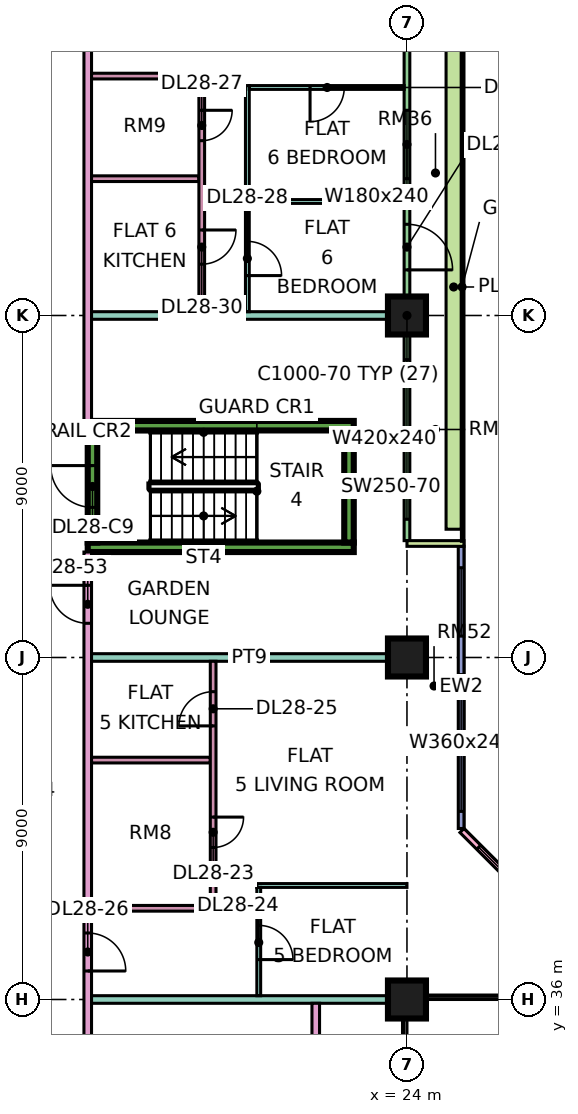
"""IFC4 building model, lengths in metres.
Left out: names, types, materials, properties, quantities, classifications, styles, units other than length and angle.
Written with IfcOpenShell. Run it as: python <this file> out.ifc"""

import sys

from ifc_helpers import new_model, si_unit, direction, frame, frame_2d, origin, origin_2d, place, context, subcontext, project, spatial, rectangle, extrude, element, fill, save


model = new_model("IFC4")
c1 = context("Model", 3, precision=1e-05, world=origin(), true_north=direction((0.0, 1.0)))
c2 = subcontext(c1, "Body", "Model", "MODEL_VIEW")
j1 = project(units=[si_unit("LENGTHUNIT", "METRE"), si_unit("PLANEANGLEUNIT", "RADIAN")], contexts=[c1])
p1 = place(None, origin())
s1 = spatial("IfcSite", under=j1, at=p1, CompositionType="ELEMENT")
p2 = place(p1, origin())
s2 = spatial("IfcBuilding", under=s1, at=p2, CompositionType="ELEMENT")
p3 = place(p2, frame((0.0, 0.0, 121.9)))
s3 = spatial("IfcBuildingStorey", under=s2, at=p3, CompositionType="ELEMENT", Elevation=121.9)
for number, where, z_axis, x_axis in (
    (1, (24.0, 36.0, 0.0), (0.0, 0.0, 1.0), (1.0, 0.0, 0.0)),
    (2, (24.0, 45.0, 0.0), (0.0, 0.0, 1.0), (1.0, 0.0, 0.0)),
    (3, (24.0, 54.0, 0.0), (0.0, 0.0, 1.0), (1.0, 0.0, 0.0)),
):
    element("IfcColumn", number, at=place(p3, frame(where, z_axis=z_axis, x_axis=x_axis)), inside=s3, PredefinedType="COLUMN", context=c2, shape_type="SweptSolid", body=[
        extrude(rectangle(XDim=1.0, YDim=1.0, at=origin_2d()), origin(), (0.0, 0.0, 1.0), 3.75),
    ])
for number, where, z_axis, x_axis in (
    (4, (15.6, 47.9, 0.0), (0.0, 0.0, 1.0), (1.0, 0.0, 0.0)),
    (5, (15.6, 51.1, 0.0), (0.0, 0.0, 1.0), (1.0, 0.0, 0.0)),
):
    element("IfcWall", number, at=place(p3, frame(where, z_axis=z_axis, x_axis=x_axis)), inside=s3, PredefinedType="SHEAR", context=c2, shape_type="SweptSolid", body=[
        extrude(rectangle(XDim=7.0, YDim=0.25, at=frame_2d((3.5, 0.0))), origin(), (0.0, 0.0, 1.0), 3.75),
    ])
p4 = place(p3, frame((15.725, 48.025, 0.0), z_axis=(0.0, 0.0, 1.0), x_axis=(0.0, 1.0, 0.0)))
e6 = element("IfcWall", 6, at=p4, inside=s3, PredefinedType="SHEAR", context=c2, shape_type="SweptSolid", body=[
    extrude(rectangle(XDim=2.95, YDim=0.25, at=frame_2d((1.475, 0.0))), origin(), (0.0, 0.0, 1.0), 3.75),
])
p5 = place(p4, frame((0.925, 0.0, 0.0)))
e7 = element("IfcOpeningElement", 7, at=p5, cuts=e6, PredefinedType="OPENING", context=c2, shape_type="SweptSolid", body=[
    extrude(rectangle(XDim=1.1, YDim=2.2, at=frame_2d((0.55, 1.1))), frame((0.0, 0.135, 0.0), z_axis=(0.0, -1.0, 0.0), x_axis=(1.0, 0.0, 0.0)), (0.0, 0.0, 1.0), 0.27),
])
p6 = place(p3, frame((22.475, 48.025, 0.0), z_axis=(0.0, 0.0, 1.0), x_axis=(0.0, 1.0, 0.0)))
e8 = element("IfcWall", 8, at=p6, inside=s3, PredefinedType="SHEAR", context=c2, shape_type="SweptSolid", body=[
    extrude(rectangle(XDim=2.95, YDim=0.25, at=frame_2d((1.475, 0.0))), origin(), (0.0, 0.0, 1.0), 3.75),
])
p7 = place(p3, frame((28.447, 37.447, 0.0), z_axis=(0.0, 0.0, 1.0), x_axis=(-0.707106781187, 0.707106781187, 0.0)))
e9 = element("IfcWall", 9, at=p7, inside=s3, PredefinedType="SOLIDWALL", context=c2, shape_type="SweptSolid", body=[
    extrude(rectangle(XDim=4.243, YDim=0.15, at=frame_2d((2.121, 0.0))), origin(), (0.0, 0.0, 1.0), 3.35),
])
p8 = place(p7, frame((0.621, 0.0, 0.45)))
e10 = element("IfcOpeningElement", 10, at=p8, cuts=e9, PredefinedType="OPENING", context=c2, shape_type="SweptSolid", body=[
    extrude(rectangle(XDim=3.0, YDim=2.4, at=frame_2d((1.5, 1.2))), frame((0.0, 0.085, 0.0), z_axis=(0.0, -1.0, 0.0), x_axis=(1.0, 0.0, 0.0)), (0.0, 0.0, 1.0), 0.17),
])
p9 = place(p3, frame((25.425, 40.5, 0.0), z_axis=(0.0, 0.0, 1.0), x_axis=(0.0, 1.0, 0.0)))
e11 = element("IfcWall", 11, at=p9, inside=s3, PredefinedType="SOLIDWALL", context=c2, shape_type="SweptSolid", body=[
    extrude(rectangle(XDim=7.425, YDim=0.15, at=frame_2d((3.712, 0.0))), origin(), (0.0, 0.0, 1.0), 3.35),
])
p10 = place(p9, frame((0.45, 0.0, 0.45)))
e12 = element("IfcOpeningElement", 12, at=p10, cuts=e11, PredefinedType="OPENING", context=c2, shape_type="SweptSolid", body=[
    extrude(rectangle(XDim=3.6, YDim=2.4, at=frame_2d((1.8, 1.2))), frame((0.0, 0.085, 0.0), z_axis=(0.0, -1.0, 0.0), x_axis=(1.0, 0.0, 0.0)), (0.0, 0.0, 1.0), 0.17),
])
p11 = place(p9, frame((5.062, 0.0, 0.45)))
e13 = element("IfcOpeningElement", 13, at=p11, cuts=e11, PredefinedType="OPENING", context=c2, shape_type="SweptSolid", body=[
    extrude(rectangle(XDim=1.8, YDim=2.4, at=frame_2d((0.9, 1.2))), frame((0.0, 0.085, 0.0), z_axis=(0.0, -1.0, 0.0), x_axis=(1.0, 0.0, 0.0)), (0.0, 0.0, 1.0), 0.17),
])
p12 = place(p3, frame((24.0, 48.075, 0.0), z_axis=(0.0, 0.0, 1.0), x_axis=(0.0, 1.0, 0.0)))
e14 = element("IfcWall", 14, at=p12, inside=s3, PredefinedType="SOLIDWALL", context=c2, shape_type="SweptSolid", body=[
    extrude(rectangle(XDim=13.35, YDim=0.15, at=frame_2d((6.675, 0.0))), origin(), (0.0, 0.0, 1.0), 3.35),
])
p13 = place(p12, frame((0.562, 0.0, 0.45)))
e15 = element("IfcOpeningElement", 15, at=p13, cuts=e14, PredefinedType="OPENING", context=c2, shape_type="SweptSolid", body=[
    extrude(rectangle(XDim=4.2, YDim=2.4, at=frame_2d((2.1, 1.2))), frame((0.0, 0.085, 0.0), z_axis=(0.0, -1.0, 0.0), x_axis=(1.0, 0.0, 0.0)), (0.0, 0.0, 1.0), 0.17),
])
p14 = place(p12, frame((7.125, 0.0, 0.0)))
e16 = element("IfcOpeningElement", 16, at=p14, cuts=e14, PredefinedType="OPENING", context=c2, shape_type="SweptSolid", body=[
    extrude(rectangle(XDim=1.2, YDim=2.4, at=frame_2d((0.6, 1.2))), frame((0.0, 0.085, 0.0), z_axis=(0.0, -1.0, 0.0), x_axis=(1.0, 0.0, 0.0)), (0.0, 0.0, 1.0), 0.17),
])
p15 = place(p12, frame((9.525, 0.0, 0.45)))
e17 = element("IfcOpeningElement", 17, at=p15, cuts=e14, PredefinedType="OPENING", context=c2, shape_type="SweptSolid", body=[
    extrude(rectangle(XDim=1.8, YDim=2.4, at=frame_2d((0.9, 1.2))), frame((0.0, 0.085, 0.0), z_axis=(0.0, -1.0, 0.0), x_axis=(1.0, 0.0, 0.0)), (0.0, 0.0, 1.0), 0.17),
])
p16 = place(p3, frame((25.5, 48.0, 0.0), z_axis=(0.0, 0.0, 1.0), x_axis=(-1.0, 0.0, 0.0)))
e18 = element("IfcWall", 18, at=p16, inside=s3, PredefinedType="SOLIDWALL", context=c2, shape_type="SweptSolid", body=[
    extrude(rectangle(XDim=1.5, YDim=0.15, at=frame_2d((0.75, 0.0))), origin(), (0.0, 0.0, 1.0), 3.35),
])
p17 = place(p3, frame((25.229, 48.375, 0.0), z_axis=(0.0, 0.0, 1.0), x_axis=(0.0, 1.0, 0.0)))
e19 = element("IfcWall", 19, at=p17, inside=s3, PredefinedType="SOLIDWALL", context=c2, shape_type="SweptSolid", body=[
    extrude(rectangle(XDim=12.75, YDim=0.4, at=frame_2d((6.375, 0.0))), origin(), (0.0, 0.0, 1.0), 0.7),
])
p18 = place(p3, frame((15.6, 20.0, 0.0), z_axis=(0.0, 0.0, 1.0), x_axis=(0.0, 1.0, 0.0)))
e20 = element("IfcWall", 20, at=p18, inside=s3, PredefinedType="PARTITIONING", context=c2, shape_type="SweptSolid", body=[
    extrude(rectangle(XDim=27.775, YDim=0.2, at=frame_2d((13.887, 0.0))), origin(), (0.0, 0.0, 1.0), 3.35),
])
p19 = place(p18, frame((7.0, 0.0, 0.0)))
e21 = element("IfcOpeningElement", 21, at=p19, cuts=e20, PredefinedType="OPENING", context=c2, shape_type="SweptSolid", body=[
    extrude(rectangle(XDim=1.0, YDim=2.1, at=frame_2d((0.5, 1.05))), frame((0.0, 0.11, 0.0), z_axis=(0.0, -1.0, 0.0), x_axis=(1.0, 0.0, 0.0)), (0.0, 0.0, 1.0), 0.22),
])
p20 = place(p18, frame((12.95, 0.0, 0.0)))
e22 = element("IfcOpeningElement", 22, at=p20, cuts=e20, PredefinedType="OPENING", context=c2, shape_type="SweptSolid", body=[
    extrude(rectangle(XDim=1.0, YDim=2.1, at=frame_2d((0.5, 1.05))), frame((0.0, 0.11, 0.0), z_axis=(0.0, -1.0, 0.0), x_axis=(1.0, 0.0, 0.0)), (0.0, 0.0, 1.0), 0.22),
])
p21 = place(p18, frame((16.75, 0.0, 0.0)))
e23 = element("IfcOpeningElement", 23, at=p21, cuts=e20, PredefinedType="OPENING", context=c2, shape_type="SweptSolid", body=[
    extrude(rectangle(XDim=1.0, YDim=2.1, at=frame_2d((0.5, 1.05))), frame((0.0, 0.11, 0.0), z_axis=(0.0, -1.0, 0.0), x_axis=(1.0, 0.0, 0.0)), (0.0, 0.0, 1.0), 0.22),
])
p22 = place(p18, frame((1.15, 0.0, 0.0)))
e24 = element("IfcOpeningElement", 24, at=p22, cuts=e20, PredefinedType="OPENING", context=c2, shape_type="SweptSolid", body=[
    extrude(rectangle(XDim=1.8, YDim=2.1, at=frame_2d((0.9, 1.05))), frame((0.0, 0.11, 0.0), z_axis=(0.0, -1.0, 0.0), x_axis=(1.0, 0.0, 0.0)), (0.0, 0.0, 1.0), 0.22),
])
p23 = place(p18, frame((25.9, 0.0, 0.0)))
e25 = element("IfcOpeningElement", 25, at=p23, cuts=e20, PredefinedType="OPENING", context=c2, shape_type="SweptSolid", body=[
    extrude(rectangle(XDim=1.0, YDim=2.1, at=frame_2d((0.5, 1.05))), frame((0.0, 0.11, 0.0), z_axis=(0.0, -1.0, 0.0), x_axis=(1.0, 0.0, 0.0)), (0.0, 0.0, 1.0), 0.22),
])
p24 = place(p3, frame((15.6, 51.225, 0.0), z_axis=(0.0, 0.0, 1.0), x_axis=(0.0, 1.0, 0.0)))
e26 = element("IfcWall", 26, at=p24, inside=s3, PredefinedType="PARTITIONING", context=c2, shape_type="SweptSolid", body=[
    extrude(rectangle(XDim=13.125, YDim=0.2, at=frame_2d((6.562, 0.0))), origin(), (0.0, 0.0, 1.0), 3.35),
])
p25 = place(p24, frame((9.975, 0.0, 0.0)))
e27 = element("IfcOpeningElement", 27, at=p25, cuts=e26, PredefinedType="OPENING", context=c2, shape_type="SweptSolid", body=[
    extrude(rectangle(XDim=1.0, YDim=2.1, at=frame_2d((0.5, 1.05))), frame((0.0, 0.11, 0.0), z_axis=(0.0, -1.0, 0.0), x_axis=(1.0, 0.0, 0.0)), (0.0, 0.0, 1.0), 0.22),
])
p26 = place(p3, frame((15.7, 36.0, 0.0), z_axis=(0.0, 0.0, 1.0), x_axis=(1.0, 0.0, 0.0)))
e28 = element("IfcWall", 28, at=p26, inside=s3, PredefinedType="PARTITIONING", context=c2, shape_type="SweptSolid", body=[
    extrude(rectangle(XDim=8.3, YDim=0.2, at=frame_2d((4.15, 0.0))), origin(), (0.0, 0.0, 1.0), 3.35),
])
for number, where, z_axis, x_axis in (
    (29, (15.7, 38.4, 0.0), (0.0, 0.0, 1.0), (1.0, 0.0, 0.0)),
    (30, (15.7, 42.3, 0.0), (0.0, 0.0, 1.0), (1.0, 0.0, 0.0)),
):
    element("IfcWall", number, at=place(p3, frame(where, z_axis=z_axis, x_axis=x_axis)), inside=s3, PredefinedType="PARTITIONING", context=c2, shape_type="SweptSolid", body=[
        extrude(rectangle(XDim=3.125, YDim=0.15, at=frame_2d((1.562, 0.0))), origin(), (0.0, 0.0, 1.0), 3.35),
    ])
p27 = place(p3, frame((15.7, 45.0, 0.0), z_axis=(0.0, 0.0, 1.0), x_axis=(1.0, 0.0, 0.0)))
e31 = element("IfcWall", 31, at=p27, inside=s3, PredefinedType="PARTITIONING", context=c2, shape_type="SweptSolid", body=[
    extrude(rectangle(XDim=8.3, YDim=0.2, at=frame_2d((4.15, 0.0))), origin(), (0.0, 0.0, 1.0), 3.35),
])
p28 = place(p3, frame((15.7, 54.0, 0.0), z_axis=(0.0, 0.0, 1.0), x_axis=(1.0, 0.0, 0.0)))
e32 = element("IfcWall", 32, at=p28, inside=s3, PredefinedType="PARTITIONING", context=c2, shape_type="SweptSolid", body=[
    extrude(rectangle(XDim=8.226, YDim=0.2, at=frame_2d((4.113, 0.0))), origin(), (0.0, 0.0, 1.0), 3.35),
])
for number, where, z_axis, x_axis in (
    (33, (15.7, 57.6, 0.0), (0.0, 0.0, 1.0), (1.0, 0.0, 0.0)),
    (34, (15.7, 60.3, 0.0), (0.0, 0.0, 1.0), (1.0, 0.0, 0.0)),
):
    element("IfcWall", number, at=place(p3, frame(where, z_axis=z_axis, x_axis=x_axis)), inside=s3, PredefinedType="PARTITIONING", context=c2, shape_type="SweptSolid", body=[
        extrude(rectangle(XDim=2.825, YDim=0.15, at=frame_2d((1.413, 0.0))), origin(), (0.0, 0.0, 1.0), 3.35),
    ])
p29 = place(p3, frame((18.6, 54.1, 0.0), z_axis=(0.0, 0.0, 1.0), x_axis=(0.0, 1.0, 0.0)))
e35 = element("IfcWall", 35, at=p29, inside=s3, PredefinedType="PARTITIONING", context=c2, shape_type="SweptSolid", body=[
    extrude(rectangle(XDim=6.275, YDim=0.15, at=frame_2d((3.137, 0.0))), origin(), (0.0, 0.0, 1.0), 3.35),
])
p30 = place(p29, frame((4.5, 0.0, 0.0)))
e36 = element("IfcOpeningElement", 36, at=p30, cuts=e35, PredefinedType="OPENING", context=c2, shape_type="SweptSolid", body=[
    extrude(rectangle(XDim=0.8, YDim=2.1, at=frame_2d((0.4, 1.05))), frame((0.0, 0.085, 0.0), z_axis=(0.0, -1.0, 0.0), x_axis=(1.0, 0.0, 0.0)), (0.0, 0.0, 1.0), 0.17),
])
p31 = place(p29, frame((1.25, 0.0, 0.0)))
e37 = element("IfcOpeningElement", 37, at=p31, cuts=e35, PredefinedType="OPENING", context=c2, shape_type="SweptSolid", body=[
    extrude(rectangle(XDim=0.9, YDim=2.1, at=frame_2d((0.45, 1.05))), frame((0.0, 0.085, 0.0), z_axis=(0.0, -1.0, 0.0), x_axis=(1.0, 0.0, 0.0)), (0.0, 0.0, 1.0), 0.17),
])
p32 = place(p3, frame((18.9, 38.325, 0.0), z_axis=(0.0, 0.0, 1.0), x_axis=(0.0, 1.0, 0.0)))
e38 = element("IfcWall", 38, at=p32, inside=s3, PredefinedType="PARTITIONING", context=c2, shape_type="SweptSolid", body=[
    extrude(rectangle(XDim=6.575, YDim=0.15, at=frame_2d((3.288, 0.0))), origin(), (0.0, 0.0, 1.0), 3.35),
])
p33 = place(p32, frame((1.675, 0.0, 0.0)))
e39 = element("IfcOpeningElement", 39, at=p33, cuts=e38, PredefinedType="OPENING", context=c2, shape_type="SweptSolid", body=[
    extrude(rectangle(XDim=0.8, YDim=2.1, at=frame_2d((0.4, 1.05))), frame((0.0, 0.085, 0.0), z_axis=(0.0, -1.0, 0.0), x_axis=(1.0, 0.0, 0.0)), (0.0, 0.0, 1.0), 0.17),
])
p34 = place(p32, frame((4.875, 0.0, 0.0)))
e40 = element("IfcOpeningElement", 40, at=p34, cuts=e38, PredefinedType="OPENING", context=c2, shape_type="SweptSolid", body=[
    extrude(rectangle(XDim=0.9, YDim=2.1, at=frame_2d((0.45, 1.05))), frame((0.0, 0.085, 0.0), z_axis=(0.0, -1.0, 0.0), x_axis=(1.0, 0.0, 0.0)), (0.0, 0.0, 1.0), 0.17),
])
p35 = place(p3, frame((19.8, 54.1, 0.0), z_axis=(0.0, 0.0, 1.0), x_axis=(0.0, 1.0, 0.0)))
e41 = element("IfcWall", 41, at=p35, inside=s3, PredefinedType="PARTITIONING", context=c2, shape_type="SweptSolid", body=[
    extrude(rectangle(XDim=5.95, YDim=0.1, at=frame_2d((2.975, 0.0))), origin(), (0.0, 0.0, 1.0), 3.35),
])
p36 = place(p35, frame((0.95, 0.0, 0.0)))
e42 = element("IfcOpeningElement", 42, at=p36, cuts=e41, PredefinedType="OPENING", context=c2, shape_type="SweptSolid", body=[
    extrude(rectangle(XDim=0.9, YDim=2.1, at=frame_2d((0.45, 1.05))), frame((0.0, 0.06, 0.0), z_axis=(0.0, -1.0, 0.0), x_axis=(1.0, 0.0, 0.0)), (0.0, 0.0, 1.0), 0.12),
])
p37 = place(p3, frame((19.85, 57.0, 0.0), z_axis=(0.0, 0.0, 1.0), x_axis=(1.0, 0.0, 0.0)))
e43 = element("IfcWall", 43, at=p37, inside=s3, PredefinedType="PARTITIONING", context=c2, shape_type="SweptSolid", body=[
    extrude(rectangle(XDim=4.076, YDim=0.1, at=frame_2d((2.038, 0.0))), origin(), (0.0, 0.0, 1.0), 3.35),
])
p38 = place(p3, frame((19.85, 60.0, 0.0), z_axis=(0.0, 0.0, 1.0), x_axis=(1.0, 0.0, 0.0)))
e44 = element("IfcWall", 44, at=p38, inside=s3, PredefinedType="PARTITIONING", context=c2, shape_type="SweptSolid", body=[
    extrude(rectangle(XDim=4.076, YDim=0.1, at=frame_2d((2.038, 0.0))), origin(), (0.0, 0.0, 1.0), 3.35),
])
p39 = place(p38, frame((1.6, 0.0, 0.0)))
e45 = element("IfcOpeningElement", 45, at=p39, cuts=e44, PredefinedType="OPENING", context=c2, shape_type="SweptSolid", body=[
    extrude(rectangle(XDim=0.9, YDim=2.1, at=frame_2d((0.45, 1.05))), frame((0.0, 0.06, 0.0), z_axis=(0.0, -1.0, 0.0), x_axis=(1.0, 0.0, 0.0)), (0.0, 0.0, 1.0), 0.12),
])
p40 = place(p3, frame((20.05, 39.0, 0.0), z_axis=(0.0, 0.0, 1.0), x_axis=(1.0, 0.0, 0.0)))
e46 = element("IfcWall", 46, at=p40, inside=s3, PredefinedType="PARTITIONING", context=c2, shape_type="SweptSolid", body=[
    extrude(rectangle(XDim=3.95, YDim=0.1, at=frame_2d((1.975, 0.0))), origin(), (0.0, 0.0, 1.0), 3.35),
])
p41 = place(p3, frame((20.1, 36.1, 0.0), z_axis=(0.0, 0.0, 1.0), x_axis=(0.0, 1.0, 0.0)))
e47 = element("IfcWall", 47, at=p41, inside=s3, PredefinedType="PARTITIONING", context=c2, shape_type="SweptSolid", body=[
    extrude(rectangle(XDim=2.85, YDim=0.1, at=frame_2d((1.425, 0.0))), origin(), (0.0, 0.0, 1.0), 3.35),
])
p42 = place(p41, frame((0.95, 0.0, 0.0)))
e48 = element("IfcOpeningElement", 48, at=p42, cuts=e47, PredefinedType="OPENING", context=c2, shape_type="SweptSolid", body=[
    extrude(rectangle(XDim=0.9, YDim=2.1, at=frame_2d((0.45, 1.05))), frame((0.0, 0.06, 0.0), z_axis=(0.0, -1.0, 0.0), x_axis=(1.0, 0.0, 0.0)), (0.0, 0.0, 1.0), 0.12),
])
p43 = place(p3, frame((21.6, 23.9, 0.0), z_axis=(0.0, 0.0, 1.0), x_axis=(0.0, 1.0, 0.0)))
e49 = element("IfcWall", 49, at=p43, inside=s3, PredefinedType="PARTITIONING", context=c2, shape_type="SweptSolid", body=[
    extrude(rectangle(XDim=12.0, YDim=0.2, at=frame_2d((6.0, 0.0))), origin(), (0.0, 0.0, 1.0), 3.35),
])
p44 = place(p8, origin())
e50 = element("IfcWindow", 50, at=p44, inside=s3, PartitioningType="SINGLE_PANEL", PredefinedType="WINDOW", context=c2, shape_type="SweptSolid", body=[
    extrude(rectangle(XDim=3.0, YDim=2.4, at=frame_2d((1.5, 1.2))), frame((0.0, 0.03, 0.0), z_axis=(0.0, -1.0, 0.0), x_axis=(1.0, 0.0, 0.0)), (0.0, 0.0, 1.0), 0.06),
])
fill(e10, e50)
p45 = place(p10, origin())
e51 = element("IfcWindow", 51, at=p45, inside=s3, PartitioningType="SINGLE_PANEL", PredefinedType="WINDOW", context=c2, shape_type="SweptSolid", body=[
    extrude(rectangle(XDim=3.6, YDim=2.4, at=frame_2d((1.8, 1.2))), frame((0.0, 0.03, 0.0), z_axis=(0.0, -1.0, 0.0), x_axis=(1.0, 0.0, 0.0)), (0.0, 0.0, 1.0), 0.06),
])
fill(e12, e51)
p46 = place(p11, origin())
e52 = element("IfcWindow", 52, at=p46, inside=s3, PartitioningType="SINGLE_PANEL", PredefinedType="WINDOW", context=c2, shape_type="SweptSolid", body=[
    extrude(rectangle(XDim=1.8, YDim=2.4, at=frame_2d((0.9, 1.2))), frame((0.0, 0.03, 0.0), z_axis=(0.0, -1.0, 0.0), x_axis=(1.0, 0.0, 0.0)), (0.0, 0.0, 1.0), 0.06),
])
fill(e13, e52)
p47 = place(p13, origin())
e53 = element("IfcWindow", 53, at=p47, inside=s3, PartitioningType="SINGLE_PANEL", PredefinedType="WINDOW", context=c2, shape_type="SweptSolid", body=[
    extrude(rectangle(XDim=4.2, YDim=2.4, at=frame_2d((2.1, 1.2))), frame((0.0, 0.03, 0.0), z_axis=(0.0, -1.0, 0.0), x_axis=(1.0, 0.0, 0.0)), (0.0, 0.0, 1.0), 0.06),
])
fill(e15, e53)
p48 = place(p14, frame((1.2, 0.0, 0.0), z_axis=(0.0, 0.0, 1.0), x_axis=(-1.0, 0.0, 0.0)))
e54 = element("IfcDoor", 54, at=p48, inside=s3, OperationType="DOUBLE_DOOR_SINGLE_SWING", PredefinedType="DOOR", context=c2, shape_type="SweptSolid", body=[
    extrude(rectangle(XDim=1.2, YDim=2.4, at=frame_2d((0.6, 1.2))), frame((0.0, 0.025, 0.0), z_axis=(0.0, -1.0, 0.0), x_axis=(1.0, 0.0, 0.0)), (0.0, 0.0, 1.0), 0.05),
])
fill(e16, e54)
p49 = place(p15, origin())
e55 = element("IfcWindow", 55, at=p49, inside=s3, PartitioningType="SINGLE_PANEL", PredefinedType="WINDOW", context=c2, shape_type="SweptSolid", body=[
    extrude(rectangle(XDim=1.8, YDim=2.4, at=frame_2d((0.9, 1.2))), frame((0.0, 0.03, 0.0), z_axis=(0.0, -1.0, 0.0), x_axis=(1.0, 0.0, 0.0)), (0.0, 0.0, 1.0), 0.06),
])
fill(e17, e55)
p50 = place(p5, frame((1.1, 0.0, 0.0), z_axis=(0.0, 0.0, 1.0), x_axis=(-1.0, 0.0, 0.0)))
e56 = element("IfcDoor", 56, at=p50, inside=s3, OperationType="SINGLE_SWING_RIGHT", PredefinedType="DOOR", context=c2, shape_type="SweptSolid", body=[
    extrude(rectangle(XDim=1.1, YDim=2.2, at=frame_2d((0.55, 1.1))), frame((0.0, 0.025, 0.0), z_axis=(0.0, -1.0, 0.0), x_axis=(1.0, 0.0, 0.0)), (0.0, 0.0, 1.0), 0.05),
])
fill(e7, e56)
p51 = place(p33, origin())
e57 = element("IfcDoor", 57, at=p51, inside=s3, OperationType="SINGLE_SWING_RIGHT", PredefinedType="DOOR", context=c2, shape_type="SweptSolid", body=[
    extrude(rectangle(XDim=0.8, YDim=2.1, at=frame_2d((0.4, 1.05))), frame((0.0, 0.025, 0.0), z_axis=(0.0, -1.0, 0.0), x_axis=(1.0, 0.0, 0.0)), (0.0, 0.0, 1.0), 0.05),
])
fill(e39, e57)
p52 = place(p42, frame((0.9, 0.0, 0.0), z_axis=(0.0, 0.0, 1.0), x_axis=(-1.0, 0.0, 0.0)))
e58 = element("IfcDoor", 58, at=p52, inside=s3, OperationType="SINGLE_SWING_LEFT", PredefinedType="DOOR", context=c2, shape_type="SweptSolid", body=[
    extrude(rectangle(XDim=0.9, YDim=2.1, at=frame_2d((0.45, 1.05))), frame((0.0, 0.025, 0.0), z_axis=(0.0, -1.0, 0.0), x_axis=(1.0, 0.0, 0.0)), (0.0, 0.0, 1.0), 0.05),
])
fill(e48, e58)
p53 = place(p34, origin())
e59 = element("IfcDoor", 59, at=p53, inside=s3, OperationType="SINGLE_SWING_LEFT", PredefinedType="DOOR", context=c2, shape_type="SweptSolid", body=[
    extrude(rectangle(XDim=0.9, YDim=2.1, at=frame_2d((0.45, 1.05))), frame((0.0, 0.025, 0.0), z_axis=(0.0, -1.0, 0.0), x_axis=(1.0, 0.0, 0.0)), (0.0, 0.0, 1.0), 0.05),
])
fill(e40, e59)
p54 = place(p21, frame((1.0, 0.0, 0.0), z_axis=(0.0, 0.0, 1.0), x_axis=(-1.0, 0.0, 0.0)))
e60 = element("IfcDoor", 60, at=p54, inside=s3, OperationType="SINGLE_SWING_LEFT", PredefinedType="DOOR", context=c2, shape_type="SweptSolid", body=[
    extrude(rectangle(XDim=1.0, YDim=2.1, at=frame_2d((0.5, 1.05))), frame((0.0, 0.025, 0.0), z_axis=(0.0, -1.0, 0.0), x_axis=(1.0, 0.0, 0.0)), (0.0, 0.0, 1.0), 0.05),
])
fill(e23, e60)
p55 = place(p30, origin())
e61 = element("IfcDoor", 61, at=p55, inside=s3, OperationType="SINGLE_SWING_RIGHT", PredefinedType="DOOR", context=c2, shape_type="SweptSolid", body=[
    extrude(rectangle(XDim=0.8, YDim=2.1, at=frame_2d((0.4, 1.05))), frame((0.0, 0.025, 0.0), z_axis=(0.0, -1.0, 0.0), x_axis=(1.0, 0.0, 0.0)), (0.0, 0.0, 1.0), 0.05),
])
fill(e36, e61)
p56 = place(p36, frame((0.9, 0.0, 0.0), z_axis=(0.0, 0.0, 1.0), x_axis=(-1.0, 0.0, 0.0)))
e62 = element("IfcDoor", 62, at=p56, inside=s3, OperationType="SINGLE_SWING_LEFT", PredefinedType="DOOR", context=c2, shape_type="SweptSolid", body=[
    extrude(rectangle(XDim=0.9, YDim=2.1, at=frame_2d((0.45, 1.05))), frame((0.0, 0.025, 0.0), z_axis=(0.0, -1.0, 0.0), x_axis=(1.0, 0.0, 0.0)), (0.0, 0.0, 1.0), 0.05),
])
fill(e42, e62)
p57 = place(p39, frame((0.9, 0.0, 0.0), z_axis=(0.0, 0.0, 1.0), x_axis=(-1.0, 0.0, 0.0)))
e63 = element("IfcDoor", 63, at=p57, inside=s3, OperationType="SINGLE_SWING_LEFT", PredefinedType="DOOR", context=c2, shape_type="SweptSolid", body=[
    extrude(rectangle(XDim=0.9, YDim=2.1, at=frame_2d((0.45, 1.05))), frame((0.0, 0.025, 0.0), z_axis=(0.0, -1.0, 0.0), x_axis=(1.0, 0.0, 0.0)), (0.0, 0.0, 1.0), 0.05),
])
fill(e45, e63)
p58 = place(p31, origin())
e64 = element("IfcDoor", 64, at=p58, inside=s3, OperationType="SINGLE_SWING_RIGHT", PredefinedType="DOOR", context=c2, shape_type="SweptSolid", body=[
    extrude(rectangle(XDim=0.9, YDim=2.1, at=frame_2d((0.45, 1.05))), frame((0.0, 0.025, 0.0), z_axis=(0.0, -1.0, 0.0), x_axis=(1.0, 0.0, 0.0)), (0.0, 0.0, 1.0), 0.05),
])
fill(e37, e64)
p59 = place(p23, frame((1.0, 0.0, 0.0), z_axis=(0.0, 0.0, 1.0), x_axis=(-1.0, 0.0, 0.0)))
e65 = element("IfcDoor", 65, at=p59, inside=s3, OperationType="SINGLE_SWING_RIGHT", PredefinedType="DOOR", context=c2, shape_type="SweptSolid", body=[
    extrude(rectangle(XDim=1.0, YDim=2.1, at=frame_2d((0.5, 1.05))), frame((0.0, 0.025, 0.0), z_axis=(0.0, -1.0, 0.0), x_axis=(1.0, 0.0, 0.0)), (0.0, 0.0, 1.0), 0.05),
])
fill(e25, e65)
save(model, sys.argv[1])
